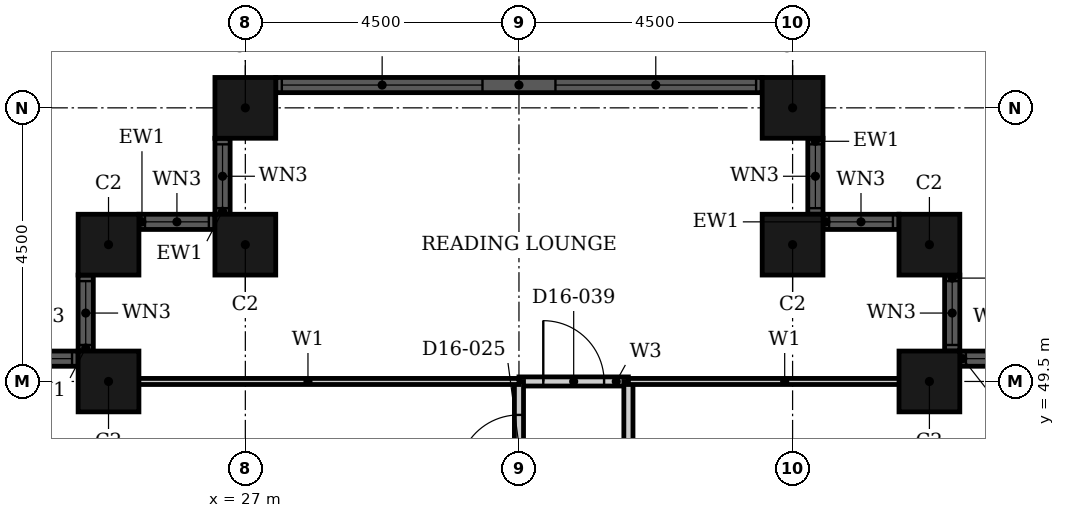
"""IFC4 building model, lengths in metres.
Left out: names, types, materials, properties, quantities, classifications, styles, units other than length and angle.
Written with IfcOpenShell. Run it as: python <this file> out.ifc"""

import sys

from ifc_helpers import new_model, si_unit, direction, frame, frame_2d, origin, origin_2d, place, context, subcontext, project, spatial, rectangle, hollow_rectangle, extrude, element, fill, save


model = new_model("IFC4")
c1 = context("Model", 3, precision=1e-05, world=origin(), true_north=direction((0.0, 1.0)))
c2 = subcontext(c1, "Body", "Model", "MODEL_VIEW")
j1 = project(units=[si_unit("LENGTHUNIT", "METRE"), si_unit("PLANEANGLEUNIT", "RADIAN")], contexts=[c1])
p1 = place(None, origin())
s1 = spatial("IfcSite", under=j1, at=p1, CompositionType="ELEMENT")
p2 = place(p1, origin())
s2 = spatial("IfcBuilding", under=s1, at=p2, CompositionType="ELEMENT")
p3 = place(p2, frame((0.0, 0.0, 70.8)))
s3 = spatial("IfcBuildingStorey", under=s2, at=p3, CompositionType="ELEMENT", Elevation=70.8)
for number, where, z_axis, x_axis in (
    (1, (38.25, 49.5, 0.0), (0.0, 0.0, 1.0), (1.0, 0.0, 0.0)),
    (2, (38.25, 51.75, 0.0), (0.0, 0.0, 1.0), (1.0, 0.0, 0.0)),
    (3, (36.0, 51.75, 0.0), (0.0, 0.0, 1.0), (1.0, 0.0, 0.0)),
    (4, (36.0, 54.0, 0.0), (0.0, 0.0, 1.0), (1.0, 0.0, 0.0)),
    (5, (27.0, 54.0, 0.0), (0.0, 0.0, 1.0), (1.0, 0.0, 0.0)),
    (6, (27.0, 51.75, 0.0), (0.0, 0.0, 1.0), (1.0, 0.0, 0.0)),
    (7, (24.75, 51.75, 0.0), (0.0, 0.0, 1.0), (1.0, 0.0, 0.0)),
    (8, (24.75, 49.5, 0.0), (0.0, 0.0, 1.0), (1.0, 0.0, 0.0)),
):
    element("IfcColumn", number, at=place(p3, frame(where, z_axis=z_axis, x_axis=x_axis)), inside=s3, PredefinedType="COLUMN", context=c2, shape_type="SweptSolid", body=[
        extrude(hollow_rectangle(XDim=1.0, YDim=1.0, WallThickness=0.032, at=origin_2d()), origin(), (0.0, 0.0, 1.0), 3.6),
    ])
p4 = place(p3, frame((40.0, 49.875, 0.0), z_axis=(0.0, 0.0, 1.0), x_axis=(-1.0, 0.0, 0.0)))
e9 = element("IfcWall", 9, at=p4, inside=s3, PredefinedType="SOLIDWALL", context=c2, shape_type="SweptSolid", body=[
    extrude(rectangle(XDim=1.25, YDim=0.25, at=frame_2d((0.625, 0.0))), origin(), (0.0, 0.0, 1.0), 3.6),
])
p5 = place(p4, frame((0.1, 0.0, 0.9)))
e10 = element("IfcOpeningElement", 10, at=p5, cuts=e9, PredefinedType="OPENING", context=c2, shape_type="SweptSolid", body=[
    extrude(rectangle(XDim=1.05, YDim=2.08, at=frame_2d((0.525, 1.04))), frame((0.0, 0.135, 0.0), z_axis=(0.0, -1.0, 0.0), x_axis=(1.0, 0.0, 0.0)), (0.0, 0.0, 1.0), 0.27),
])
p6 = place(p3, frame((38.625, 50.0, 0.0), z_axis=(0.0, 0.0, 1.0), x_axis=(0.0, 1.0, 0.0)))
e11 = element("IfcWall", 11, at=p6, inside=s3, PredefinedType="SOLIDWALL", context=c2, shape_type="SweptSolid", body=[
    extrude(rectangle(XDim=1.25, YDim=0.25, at=frame_2d((0.625, 0.0))), origin(), (0.0, 0.0, 1.0), 3.6),
])
p7 = place(p6, frame((0.1, 0.0, 0.9)))
e12 = element("IfcOpeningElement", 12, at=p7, cuts=e11, PredefinedType="OPENING", context=c2, shape_type="SweptSolid", body=[
    extrude(rectangle(XDim=1.05, YDim=2.08, at=frame_2d((0.525, 1.04))), frame((0.0, 0.135, 0.0), z_axis=(0.0, -1.0, 0.0), x_axis=(1.0, 0.0, 0.0)), (0.0, 0.0, 1.0), 0.27),
])
p8 = place(p3, frame((37.75, 52.125, 0.0), z_axis=(0.0, 0.0, 1.0), x_axis=(-1.0, 0.0, 0.0)))
e13 = element("IfcWall", 13, at=p8, inside=s3, PredefinedType="SOLIDWALL", context=c2, shape_type="SweptSolid", body=[
    extrude(rectangle(XDim=1.25, YDim=0.25, at=frame_2d((0.625, 0.0))), origin(), (0.0, 0.0, 1.0), 3.6),
])
p9 = place(p8, frame((0.1, 0.0, 0.9)))
e14 = element("IfcOpeningElement", 14, at=p9, cuts=e13, PredefinedType="OPENING", context=c2, shape_type="SweptSolid", body=[
    extrude(rectangle(XDim=1.05, YDim=2.08, at=frame_2d((0.525, 1.04))), frame((0.0, 0.135, 0.0), z_axis=(0.0, -1.0, 0.0), x_axis=(1.0, 0.0, 0.0)), (0.0, 0.0, 1.0), 0.27),
])
p10 = place(p3, frame((36.375, 52.25, 0.0), z_axis=(0.0, 0.0, 1.0), x_axis=(0.0, 1.0, 0.0)))
e15 = element("IfcWall", 15, at=p10, inside=s3, PredefinedType="SOLIDWALL", context=c2, shape_type="SweptSolid", body=[
    extrude(rectangle(XDim=1.25, YDim=0.25, at=frame_2d((0.625, 0.0))), origin(), (0.0, 0.0, 1.0), 3.6),
])
p11 = place(p10, frame((0.1, 0.0, 0.9)))
e16 = element("IfcOpeningElement", 16, at=p11, cuts=e15, PredefinedType="OPENING", context=c2, shape_type="SweptSolid", body=[
    extrude(rectangle(XDim=1.05, YDim=2.08, at=frame_2d((0.525, 1.04))), frame((0.0, 0.135, 0.0), z_axis=(0.0, -1.0, 0.0), x_axis=(1.0, 0.0, 0.0)), (0.0, 0.0, 1.0), 0.27),
])
p12 = place(p3, frame((35.5, 54.375, 0.0), z_axis=(0.0, 0.0, 1.0), x_axis=(-1.0, 0.0, 0.0)))
e17 = element("IfcWall", 17, at=p12, inside=s3, PredefinedType="SOLIDWALL", context=c2, shape_type="SweptSolid", body=[
    extrude(rectangle(XDim=8.0, YDim=0.25, at=frame_2d((4.0, 0.0))), origin(), (0.0, 0.0, 1.0), 3.6),
])
p13 = place(p12, frame((0.1, 0.0, 0.9)))
e18 = element("IfcOpeningElement", 18, at=p13, cuts=e17, PredefinedType="OPENING", context=c2, shape_type="SweptSolid", body=[
    extrude(rectangle(XDim=3.3, YDim=2.08, at=frame_2d((1.65, 1.04))), frame((0.0, 0.135, 0.0), z_axis=(0.0, -1.0, 0.0), x_axis=(1.0, 0.0, 0.0)), (0.0, 0.0, 1.0), 0.27),
])
p14 = place(p12, frame((4.6, 0.0, 0.9)))
e19 = element("IfcOpeningElement", 19, at=p14, cuts=e17, PredefinedType="OPENING", context=c2, shape_type="SweptSolid", body=[
    extrude(rectangle(XDim=3.3, YDim=2.08, at=frame_2d((1.65, 1.04))), frame((0.0, 0.135, 0.0), z_axis=(0.0, -1.0, 0.0), x_axis=(1.0, 0.0, 0.0)), (0.0, 0.0, 1.0), 0.27),
])
p15 = place(p3, frame((26.625, 53.5, 0.0), z_axis=(0.0, 0.0, 1.0), x_axis=(0.0, -1.0, 0.0)))
e20 = element("IfcWall", 20, at=p15, inside=s3, PredefinedType="SOLIDWALL", context=c2, shape_type="SweptSolid", body=[
    extrude(rectangle(XDim=1.25, YDim=0.25, at=frame_2d((0.625, 0.0))), origin(), (0.0, 0.0, 1.0), 3.6),
])
p16 = place(p15, frame((0.1, 0.0, 0.9)))
e21 = element("IfcOpeningElement", 21, at=p16, cuts=e20, PredefinedType="OPENING", context=c2, shape_type="SweptSolid", body=[
    extrude(rectangle(XDim=1.05, YDim=2.08, at=frame_2d((0.525, 1.04))), frame((0.0, 0.135, 0.0), z_axis=(0.0, -1.0, 0.0), x_axis=(1.0, 0.0, 0.0)), (0.0, 0.0, 1.0), 0.27),
])
p17 = place(p3, frame((26.5, 52.125, 0.0), z_axis=(0.0, 0.0, 1.0), x_axis=(-1.0, 0.0, 0.0)))
e22 = element("IfcWall", 22, at=p17, inside=s3, PredefinedType="SOLIDWALL", context=c2, shape_type="SweptSolid", body=[
    extrude(rectangle(XDim=1.25, YDim=0.25, at=frame_2d((0.625, 0.0))), origin(), (0.0, 0.0, 1.0), 3.6),
])
p18 = place(p17, frame((0.1, 0.0, 0.9)))
e23 = element("IfcOpeningElement", 23, at=p18, cuts=e22, PredefinedType="OPENING", context=c2, shape_type="SweptSolid", body=[
    extrude(rectangle(XDim=1.05, YDim=2.08, at=frame_2d((0.525, 1.04))), frame((0.0, 0.135, 0.0), z_axis=(0.0, -1.0, 0.0), x_axis=(1.0, 0.0, 0.0)), (0.0, 0.0, 1.0), 0.27),
])
p19 = place(p3, frame((24.375, 51.25, 0.0), z_axis=(0.0, 0.0, 1.0), x_axis=(0.0, -1.0, 0.0)))
e24 = element("IfcWall", 24, at=p19, inside=s3, PredefinedType="SOLIDWALL", context=c2, shape_type="SweptSolid", body=[
    extrude(rectangle(XDim=1.25, YDim=0.25, at=frame_2d((0.625, 0.0))), origin(), (0.0, 0.0, 1.0), 3.6),
])
p20 = place(p19, frame((0.1, 0.0, 0.9)))
e25 = element("IfcOpeningElement", 25, at=p20, cuts=e24, PredefinedType="OPENING", context=c2, shape_type="SweptSolid", body=[
    extrude(rectangle(XDim=1.05, YDim=2.08, at=frame_2d((0.525, 1.04))), frame((0.0, 0.135, 0.0), z_axis=(0.0, -1.0, 0.0), x_axis=(1.0, 0.0, 0.0)), (0.0, 0.0, 1.0), 0.27),
])
p21 = place(p3, frame((24.25, 49.875, 0.0), z_axis=(0.0, 0.0, 1.0), x_axis=(-1.0, 0.0, 0.0)))
e26 = element("IfcWall", 26, at=p21, inside=s3, PredefinedType="SOLIDWALL", context=c2, shape_type="SweptSolid", body=[
    extrude(rectangle(XDim=1.25, YDim=0.25, at=frame_2d((0.625, 0.0))), origin(), (0.0, 0.0, 1.0), 3.6),
])
p22 = place(p21, frame((0.1, 0.0, 0.9)))
e27 = element("IfcOpeningElement", 27, at=p22, cuts=e26, PredefinedType="OPENING", context=c2, shape_type="SweptSolid", body=[
    extrude(rectangle(XDim=1.05, YDim=2.08, at=frame_2d((0.525, 1.04))), frame((0.0, 0.135, 0.0), z_axis=(0.0, -1.0, 0.0), x_axis=(1.0, 0.0, 0.0)), (0.0, 0.0, 1.0), 0.27),
])
p23 = place(p3, frame((31.5, 49.5, 0.0), z_axis=(0.0, 0.0, 1.0), x_axis=(1.0, 0.0, 0.0)))
e28 = element("IfcWall", 28, at=p23, inside=s3, PredefinedType="PARTITIONING", context=c2, shape_type="SweptSolid", body=[
    extrude(rectangle(XDim=1.8, YDim=0.15, at=frame_2d((0.9, 0.0))), origin(), (0.0, 0.0, 1.0), 3.3),
])
p24 = place(p23, frame((0.4, 0.0, 0.0)))
e29 = element("IfcOpeningElement", 29, at=p24, cuts=e28, PredefinedType="OPENING", context=c2, shape_type="SweptSolid", body=[
    extrude(rectangle(XDim=1.0, YDim=2.1, at=frame_2d((0.5, 1.05))), frame((0.0, 0.085, 0.0), z_axis=(0.0, -1.0, 0.0), x_axis=(1.0, 0.0, 0.0)), (0.0, 0.0, 1.0), 0.17),
])
p25 = place(p3, frame((31.5, 40.5, 0.0), z_axis=(0.0, 0.0, 1.0), x_axis=(0.0, 1.0, 0.0)))
e30 = element("IfcWall", 30, at=p25, inside=s3, PredefinedType="PARTITIONING", context=c2, shape_type="SweptSolid", body=[
    extrude(rectangle(XDim=9.0, YDim=0.15, at=frame_2d((4.5, 0.0))), origin(), (0.0, 0.0, 1.0), 2.58),
])
p26 = place(p25, frame((2.95, 0.0, 0.0)))
e31 = element("IfcOpeningElement", 31, at=p26, cuts=e30, PredefinedType="OPENING", context=c2, shape_type="SweptSolid", body=[
    extrude(rectangle(XDim=1.0, YDim=2.1, at=frame_2d((0.5, 1.05))), frame((0.0, 0.085, 0.0), z_axis=(0.0, -1.0, 0.0), x_axis=(1.0, 0.0, 0.0)), (0.0, 0.0, 1.0), 0.17),
])
p27 = place(p25, frame((7.45, 0.0, 0.0)))
e32 = element("IfcOpeningElement", 32, at=p27, cuts=e30, PredefinedType="OPENING", context=c2, shape_type="SweptSolid", body=[
    extrude(rectangle(XDim=1.0, YDim=2.1, at=frame_2d((0.5, 1.05))), frame((0.0, 0.085, 0.0), z_axis=(0.0, -1.0, 0.0), x_axis=(1.0, 0.0, 0.0)), (0.0, 0.0, 1.0), 0.17),
])
p28 = place(p3, frame((33.3, 33.3, 0.0), z_axis=(0.0, 0.0, 1.0), x_axis=(0.0, 1.0, 0.0)))
e33 = element("IfcWall", 33, at=p28, inside=s3, PredefinedType="PARTITIONING", context=c2, shape_type="SweptSolid", body=[
    extrude(rectangle(XDim=16.2, YDim=0.15, at=frame_2d((8.1, 0.0))), origin(), (0.0, 0.0, 1.0), 3.3),
])
p29 = place(p28, frame((8.95, 0.0, 0.0)))
e34 = element("IfcOpeningElement", 34, at=p29, cuts=e33, PredefinedType="OPENING", context=c2, shape_type="SweptSolid", body=[
    extrude(rectangle(XDim=1.0, YDim=2.1, at=frame_2d((0.5, 1.05))), frame((0.0, 0.085, 0.0), z_axis=(0.0, -1.0, 0.0), x_axis=(1.0, 0.0, 0.0)), (0.0, 0.0, 1.0), 0.17),
])
p30 = place(p3, frame((24.56, 49.5, 0.0), z_axis=(0.0, 0.0, 1.0), x_axis=(1.0, 0.0, 0.0)))
e35 = element("IfcWall", 35, at=p30, inside=s3, PredefinedType="PARTITIONING", context=c2, shape_type="SweptSolid", body=[
    extrude(rectangle(XDim=6.94, YDim=0.1, at=frame_2d((3.47, 0.0))), origin(), (0.0, 0.0, 1.0), 3.3),
])
p31 = place(p3, frame((33.3, 49.5, 0.0), z_axis=(0.0, 0.0, 1.0), x_axis=(1.0, 0.0, 0.0)))
e36 = element("IfcWall", 36, at=p31, inside=s3, PredefinedType="PARTITIONING", context=c2, shape_type="SweptSolid", body=[
    extrude(rectangle(XDim=5.14, YDim=0.1, at=frame_2d((2.57, 0.0))), origin(), (0.0, 0.0, 1.0), 3.3),
])
p32 = place(p5, origin())
e37 = element("IfcWindow", 37, at=p32, inside=s3, PartitioningType="SINGLE_PANEL", PredefinedType="WINDOW", context=c2, shape_type="SweptSolid", body=[
    extrude(rectangle(XDim=1.05, YDim=2.08, at=frame_2d((0.525, 1.04))), frame((0.0, 0.03, 0.0), z_axis=(0.0, -1.0, 0.0), x_axis=(1.0, 0.0, 0.0)), (0.0, 0.0, 1.0), 0.06),
])
fill(e10, e37)
p33 = place(p7, origin())
e38 = element("IfcWindow", 38, at=p33, inside=s3, PartitioningType="SINGLE_PANEL", PredefinedType="WINDOW", context=c2, shape_type="SweptSolid", body=[
    extrude(rectangle(XDim=1.05, YDim=2.08, at=frame_2d((0.525, 1.04))), frame((0.0, 0.03, 0.0), z_axis=(0.0, -1.0, 0.0), x_axis=(1.0, 0.0, 0.0)), (0.0, 0.0, 1.0), 0.06),
])
fill(e12, e38)
p34 = place(p9, origin())
e39 = element("IfcWindow", 39, at=p34, inside=s3, PartitioningType="SINGLE_PANEL", PredefinedType="WINDOW", context=c2, shape_type="SweptSolid", body=[
    extrude(rectangle(XDim=1.05, YDim=2.08, at=frame_2d((0.525, 1.04))), frame((0.0, 0.03, 0.0), z_axis=(0.0, -1.0, 0.0), x_axis=(1.0, 0.0, 0.0)), (0.0, 0.0, 1.0), 0.06),
])
fill(e14, e39)
p35 = place(p11, origin())
e40 = element("IfcWindow", 40, at=p35, inside=s3, PartitioningType="SINGLE_PANEL", PredefinedType="WINDOW", context=c2, shape_type="SweptSolid", body=[
    extrude(rectangle(XDim=1.05, YDim=2.08, at=frame_2d((0.525, 1.04))), frame((0.0, 0.03, 0.0), z_axis=(0.0, -1.0, 0.0), x_axis=(1.0, 0.0, 0.0)), (0.0, 0.0, 1.0), 0.06),
])
fill(e16, e40)
p36 = place(p13, origin())
e41 = element("IfcWindow", 41, at=p36, inside=s3, PartitioningType="SINGLE_PANEL", PredefinedType="WINDOW", context=c2, shape_type="SweptSolid", body=[
    extrude(rectangle(XDim=3.3, YDim=2.08, at=frame_2d((1.65, 1.04))), frame((0.0, 0.03, 0.0), z_axis=(0.0, -1.0, 0.0), x_axis=(1.0, 0.0, 0.0)), (0.0, 0.0, 1.0), 0.06),
])
fill(e18, e41)
p37 = place(p14, origin())
e42 = element("IfcWindow", 42, at=p37, inside=s3, PartitioningType="SINGLE_PANEL", PredefinedType="WINDOW", context=c2, shape_type="SweptSolid", body=[
    extrude(rectangle(XDim=3.3, YDim=2.08, at=frame_2d((1.65, 1.04))), frame((0.0, 0.03, 0.0), z_axis=(0.0, -1.0, 0.0), x_axis=(1.0, 0.0, 0.0)), (0.0, 0.0, 1.0), 0.06),
])
fill(e19, e42)
p38 = place(p16, origin())
e43 = element("IfcWindow", 43, at=p38, inside=s3, PartitioningType="SINGLE_PANEL", PredefinedType="WINDOW", context=c2, shape_type="SweptSolid", body=[
    extrude(rectangle(XDim=1.05, YDim=2.08, at=frame_2d((0.525, 1.04))), frame((0.0, 0.03, 0.0), z_axis=(0.0, -1.0, 0.0), x_axis=(1.0, 0.0, 0.0)), (0.0, 0.0, 1.0), 0.06),
])
fill(e21, e43)
p39 = place(p18, origin())
e44 = element("IfcWindow", 44, at=p39, inside=s3, PartitioningType="SINGLE_PANEL", PredefinedType="WINDOW", context=c2, shape_type="SweptSolid", body=[
    extrude(rectangle(XDim=1.05, YDim=2.08, at=frame_2d((0.525, 1.04))), frame((0.0, 0.03, 0.0), z_axis=(0.0, -1.0, 0.0), x_axis=(1.0, 0.0, 0.0)), (0.0, 0.0, 1.0), 0.06),
])
fill(e23, e44)
p40 = place(p20, origin())
e45 = element("IfcWindow", 45, at=p40, inside=s3, PartitioningType="SINGLE_PANEL", PredefinedType="WINDOW", context=c2, shape_type="SweptSolid", body=[
    extrude(rectangle(XDim=1.05, YDim=2.08, at=frame_2d((0.525, 1.04))), frame((0.0, 0.03, 0.0), z_axis=(0.0, -1.0, 0.0), x_axis=(1.0, 0.0, 0.0)), (0.0, 0.0, 1.0), 0.06),
])
fill(e25, e45)
p41 = place(p22, origin())
e46 = element("IfcWindow", 46, at=p41, inside=s3, PartitioningType="SINGLE_PANEL", PredefinedType="WINDOW", context=c2, shape_type="SweptSolid", body=[
    extrude(rectangle(XDim=1.05, YDim=2.08, at=frame_2d((0.525, 1.04))), frame((0.0, 0.03, 0.0), z_axis=(0.0, -1.0, 0.0), x_axis=(1.0, 0.0, 0.0)), (0.0, 0.0, 1.0), 0.06),
])
fill(e27, e46)
p42 = place(p27, origin())
e47 = element("IfcDoor", 47, at=p42, inside=s3, OperationType="SINGLE_SWING_RIGHT", PredefinedType="DOOR", context=c2, shape_type="SweptSolid", body=[
    extrude(rectangle(XDim=1.0, YDim=2.1, at=frame_2d((0.5, 1.05))), frame((0.0, 0.025, 0.0), z_axis=(0.0, -1.0, 0.0), x_axis=(1.0, 0.0, 0.0)), (0.0, 0.0, 1.0), 0.05),
])
fill(e32, e47)
p43 = place(p24, origin())
e48 = element("IfcDoor", 48, at=p43, inside=s3, OperationType="SINGLE_SWING_LEFT", PredefinedType="DOOR", context=c2, shape_type="SweptSolid", body=[
    extrude(rectangle(XDim=1.0, YDim=2.1, at=frame_2d((0.5, 1.05))), frame((0.0, 0.025, 0.0), z_axis=(0.0, -1.0, 0.0), x_axis=(1.0, 0.0, 0.0)), (0.0, 0.0, 1.0), 0.05),
])
fill(e29, e48)
save(model, sys.argv[1])
